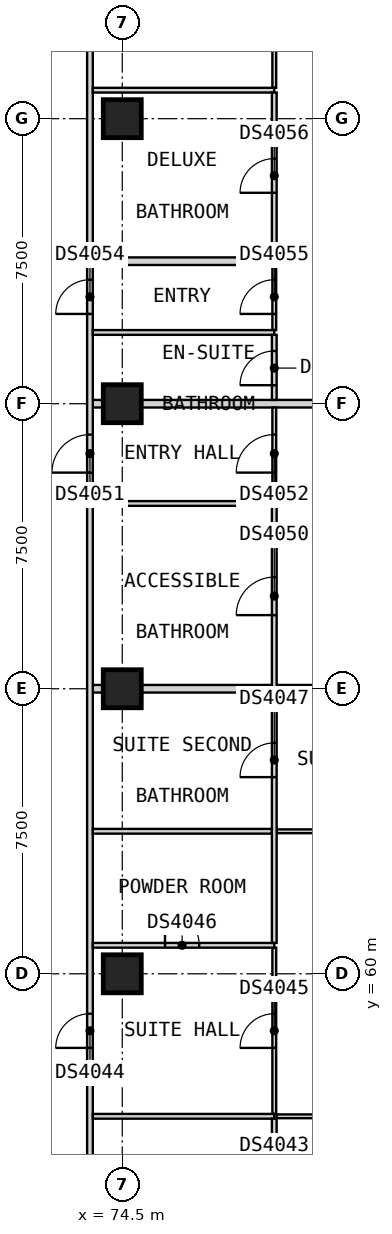
"""IFC4 building model, lengths in metres.
Left out: names, types, materials, properties, quantities, classifications, styles, units other than length and angle.
Written with IfcOpenShell. Run it as: python <this file> out.ifc"""

import sys

from ifc_helpers import new_model, si_unit, direction, frame, frame_2d, origin, origin_2d, place, context, subcontext, project, spatial, rectangle, extrude, element, fill, save


model = new_model("IFC4")
c1 = context("Model", 3, precision=1e-05, world=origin(), true_north=direction((0.0, 1.0)))
c2 = subcontext(c1, "Body", "Model", "MODEL_VIEW")
j1 = project(units=[si_unit("LENGTHUNIT", "METRE"), si_unit("PLANEANGLEUNIT", "RADIAN")], contexts=[c1])
p1 = place(None, origin())
s1 = spatial("IfcSite", under=j1, at=p1, CompositionType="ELEMENT")
p2 = place(p1, origin())
s2 = spatial("IfcBuilding", under=s1, at=p2, CompositionType="ELEMENT")
p3 = place(p2, frame((0.0, 0.0, 141.0)))
s3 = spatial("IfcBuildingStorey", under=s2, at=p3, CompositionType="ELEMENT", Elevation=141.0)
for number, where, z_axis, x_axis in (
    (1, (74.5, 60.0, 0.0), (0.0, 0.0, 1.0), (1.0, 0.0, 0.0)),
    (2, (74.5, 67.5, 0.0), (0.0, 0.0, 1.0), (1.0, 0.0, 0.0)),
    (3, (74.5, 75.0, 0.0), (0.0, 0.0, 1.0), (1.0, 0.0, 0.0)),
    (4, (74.5, 82.5, 0.0), (0.0, 0.0, 1.0), (1.0, 0.0, 0.0)),
):
    element("IfcColumn", number, at=place(p3, frame(where, z_axis=z_axis, x_axis=x_axis)), inside=s3, PredefinedType="COLUMN", context=c2, shape_type="SweptSolid", body=[
        extrude(rectangle(XDim=1.0, YDim=1.0, at=origin_2d()), origin(), (0.0, 0.0, 1.0), 3.6),
    ])
for number, where, z_axis, x_axis in (
    (5, (73.725, 67.5, 0.0), (0.0, 0.0, 1.0), (1.0, 0.0, 0.0)),
    (6, (73.725, 75.0, 0.0), (0.0, 0.0, 1.0), (1.0, 0.0, 0.0)),
):
    element("IfcWall", number, at=place(p3, frame(where, z_axis=z_axis, x_axis=x_axis)), inside=s3, PredefinedType="PARTITIONING", context=c2, shape_type="SweptSolid", body=[
        extrude(rectangle(XDim=12.525, YDim=0.2, at=frame_2d((6.262, 0.0))), origin(), (0.0, 0.0, 1.0), 3.35),
    ])
p4 = place(p3, frame((73.725, 78.75, 0.0), z_axis=(0.0, 0.0, 1.0), x_axis=(1.0, 0.0, 0.0)))
e7 = element("IfcWall", 7, at=p4, inside=s3, PredefinedType="PARTITIONING", context=c2, shape_type="SweptSolid", body=[
    extrude(rectangle(XDim=11.715, YDim=0.2, at=frame_2d((5.857, 0.0))), origin(), (0.0, 0.0, 1.0), 3.35),
])
p5 = place(p3, frame((73.65, 50.175, 0.0), z_axis=(0.0, 0.0, 1.0), x_axis=(0.0, 1.0, 0.0)))
e8 = element("IfcWall", 8, at=p5, inside=s3, PredefinedType="PARTITIONING", context=c2, shape_type="SweptSolid", body=[
    extrude(rectangle(XDim=38.4, YDim=0.15, at=frame_2d((19.2, 0.0))), origin(), (0.0, 0.0, 1.0), 3.35),
])
p6 = place(p5, frame((7.875, 0.0, 0.0)))
e9 = element("IfcOpeningElement", 9, at=p6, cuts=e8, PredefinedType="OPENING", context=c2, shape_type="SweptSolid", body=[
    extrude(rectangle(XDim=0.9, YDim=2.1, at=frame_2d((0.45, 1.05))), frame((0.0, 0.085, 0.0), z_axis=(0.0, -1.0, 0.0), x_axis=(1.0, 0.0, 0.0)), (0.0, 0.0, 1.0), 0.17),
])
p7 = place(p5, frame((23.012, 0.0, 0.0)))
e10 = element("IfcOpeningElement", 10, at=p7, cuts=e8, PredefinedType="OPENING", context=c2, shape_type="SweptSolid", body=[
    extrude(rectangle(XDim=1.0, YDim=2.1, at=frame_2d((0.5, 1.05))), frame((0.0, 0.085, 0.0), z_axis=(0.0, -1.0, 0.0), x_axis=(1.0, 0.0, 0.0)), (0.0, 0.0, 1.0), 0.17),
])
p8 = place(p5, frame((27.188, 0.0, 0.0)))
e11 = element("IfcOpeningElement", 11, at=p8, cuts=e8, PredefinedType="OPENING", context=c2, shape_type="SweptSolid", body=[
    extrude(rectangle(XDim=0.9, YDim=2.1, at=frame_2d((0.45, 1.05))), frame((0.0, 0.085, 0.0), z_axis=(0.0, -1.0, 0.0), x_axis=(1.0, 0.0, 0.0)), (0.0, 0.0, 1.0), 0.17),
])
p9 = place(p5, frame((34.125, 0.0, 0.0)))
e12 = element("IfcOpeningElement", 12, at=p9, cuts=e8, PredefinedType="OPENING", context=c2, shape_type="SweptSolid", body=[
    extrude(rectangle(XDim=0.9, YDim=2.1, at=frame_2d((0.45, 1.05))), frame((0.0, 0.085, 0.0), z_axis=(0.0, -1.0, 0.0), x_axis=(1.0, 0.0, 0.0)), (0.0, 0.0, 1.0), 0.17),
])
p10 = place(p3, frame((78.562, 56.25, 0.0), z_axis=(0.0, 0.0, 1.0), x_axis=(1.0, 0.0, 0.0)))
e13 = element("IfcWall", 13, at=p10, inside=s3, PredefinedType="PARTITIONING", context=c2, shape_type="SweptSolid", body=[
    extrude(rectangle(XDim=6.877, YDim=0.1, at=frame_2d((3.439, 0.0))), origin(), (0.0, 0.0, 1.0), 3.35),
])
p11 = place(p10, frame((3.363, 0.0, 0.0)))
e14 = element("IfcOpeningElement", 14, at=p11, cuts=e13, PredefinedType="OPENING", context=c2, shape_type="SweptSolid", body=[
    extrude(rectangle(XDim=0.9, YDim=2.1, at=frame_2d((0.45, 1.05))), frame((0.0, 0.06, 0.0), z_axis=(0.0, -1.0, 0.0), x_axis=(1.0, 0.0, 0.0)), (0.0, 0.0, 1.0), 0.12),
])
p12 = place(p3, frame((78.562, 63.75, 0.0), z_axis=(0.0, 0.0, 1.0), x_axis=(1.0, 0.0, 0.0)))
e15 = element("IfcWall", 15, at=p12, inside=s3, PredefinedType="PARTITIONING", context=c2, shape_type="SweptSolid", body=[
    extrude(rectangle(XDim=6.877, YDim=0.1, at=frame_2d((3.439, 0.0))), origin(), (0.0, 0.0, 1.0), 3.35),
])
p13 = place(p12, frame((3.363, 0.0, 0.0)))
e16 = element("IfcOpeningElement", 16, at=p13, cuts=e15, PredefinedType="OPENING", context=c2, shape_type="SweptSolid", body=[
    extrude(rectangle(XDim=0.9, YDim=2.1, at=frame_2d((0.45, 1.05))), frame((0.0, 0.06, 0.0), z_axis=(0.0, -1.0, 0.0), x_axis=(1.0, 0.0, 0.0)), (0.0, 0.0, 1.0), 0.12),
])
p14 = place(p3, frame((78.5, 56.312, 0.0), z_axis=(0.0, 0.0, 1.0), x_axis=(0.0, 1.0, 0.0)))
e17 = element("IfcWall", 17, at=p14, inside=s3, PredefinedType="PARTITIONING", context=c2, shape_type="SweptSolid", body=[
    extrude(rectangle(XDim=4.375, YDim=0.1, at=frame_2d((2.188, 0.0))), origin(), (0.0, 0.0, 1.0), 3.35),
])
p15 = place(p14, frame((1.738, 0.0, 0.0)))
e18 = element("IfcOpeningElement", 18, at=p15, cuts=e17, PredefinedType="OPENING", context=c2, shape_type="SweptSolid", body=[
    extrude(rectangle(XDim=0.9, YDim=2.1, at=frame_2d((0.45, 1.05))), frame((0.0, 0.06, 0.0), z_axis=(0.0, -1.0, 0.0), x_axis=(1.0, 0.0, 0.0)), (0.0, 0.0, 1.0), 0.12),
])
p16 = place(p3, frame((78.5, 72.438, 0.0), z_axis=(0.0, 0.0, 1.0), x_axis=(0.0, 1.0, 0.0)))
e19 = element("IfcWall", 19, at=p16, inside=s3, PredefinedType="PARTITIONING", context=c2, shape_type="SweptSolid", body=[
    extrude(rectangle(XDim=2.462, YDim=0.1, at=frame_2d((1.231, 0.0))), origin(), (0.0, 0.0, 1.0), 3.35),
])
p17 = place(p16, frame((0.75, 0.0, 0.0)))
e20 = element("IfcOpeningElement", 20, at=p17, cuts=e19, PredefinedType="OPENING", context=c2, shape_type="SweptSolid", body=[
    extrude(rectangle(XDim=1.0, YDim=2.1, at=frame_2d((0.5, 1.05))), frame((0.0, 0.06, 0.0), z_axis=(0.0, -1.0, 0.0), x_axis=(1.0, 0.0, 0.0)), (0.0, 0.0, 1.0), 0.12),
])
p18 = place(p3, frame((78.5, 76.938, 0.0), z_axis=(0.0, 0.0, 1.0), x_axis=(0.0, 1.0, 0.0)))
e21 = element("IfcWall", 21, at=p18, inside=s3, PredefinedType="PARTITIONING", context=c2, shape_type="SweptSolid", body=[
    extrude(rectangle(XDim=1.712, YDim=0.1, at=frame_2d((0.856, 0.0))), origin(), (0.0, 0.0, 1.0), 3.35),
])
p19 = place(p18, frame((0.425, 0.0, 0.0)))
e22 = element("IfcOpeningElement", 22, at=p19, cuts=e21, PredefinedType="OPENING", context=c2, shape_type="SweptSolid", body=[
    extrude(rectangle(XDim=0.9, YDim=2.1, at=frame_2d((0.45, 1.05))), frame((0.0, 0.06, 0.0), z_axis=(0.0, -1.0, 0.0), x_axis=(1.0, 0.0, 0.0)), (0.0, 0.0, 1.0), 0.12),
])
p20 = place(p3, frame((78.5, 83.312, 0.0), z_axis=(0.0, 0.0, 1.0), x_axis=(0.0, 1.0, 0.0)))
e23 = element("IfcWall", 23, at=p20, inside=s3, PredefinedType="PARTITIONING", context=c2, shape_type="SweptSolid", body=[
    extrude(rectangle(XDim=2.837, YDim=0.1, at=frame_2d((1.419, 0.0))), origin(), (0.0, 0.0, 1.0), 3.35),
])
p21 = place(p20, frame((0.988, 0.0, 0.0)))
e24 = element("IfcOpeningElement", 24, at=p21, cuts=e23, PredefinedType="OPENING", context=c2, shape_type="SweptSolid", body=[
    extrude(rectangle(XDim=0.9, YDim=2.1, at=frame_2d((0.45, 1.05))), frame((0.0, 0.06, 0.0), z_axis=(0.0, -1.0, 0.0), x_axis=(1.0, 0.0, 0.0)), (0.0, 0.0, 1.0), 0.12),
])
p22 = place(p3, frame((73.725, 56.25, 0.0), z_axis=(0.0, 0.0, 1.0), x_axis=(1.0, 0.0, 0.0)))
e25 = element("IfcWall", 25, at=p22, inside=s3, PredefinedType="PARTITIONING", context=c2, shape_type="SweptSolid", body=[
    extrude(rectangle(XDim=4.775, YDim=0.125, at=frame_2d((2.387, 0.0))), origin(), (0.0, 0.0, 1.0), 3.35),
])
p23 = place(p3, frame((73.725, 60.75, 0.0), z_axis=(0.0, 0.0, 1.0), x_axis=(1.0, 0.0, 0.0)))
e26 = element("IfcWall", 26, at=p23, inside=s3, PredefinedType="PARTITIONING", context=c2, shape_type="SweptSolid", body=[
    extrude(rectangle(XDim=4.775, YDim=0.125, at=frame_2d((2.387, 0.0))), origin(), (0.0, 0.0, 1.0), 3.35),
])
p24 = place(p23, frame((1.9, 0.0, 0.0)))
e27 = element("IfcOpeningElement", 27, at=p24, cuts=e26, PredefinedType="OPENING", context=c2, shape_type="SweptSolid", body=[
    extrude(rectangle(XDim=0.9, YDim=2.1, at=frame_2d((0.45, 1.05))), frame((0.0, 0.073, 0.0), z_axis=(0.0, -1.0, 0.0), x_axis=(1.0, 0.0, 0.0)), (0.0, 0.0, 1.0), 0.145),
])
p25 = place(p3, frame((73.725, 63.75, 0.0), z_axis=(0.0, 0.0, 1.0), x_axis=(1.0, 0.0, 0.0)))
e28 = element("IfcWall", 28, at=p25, inside=s3, PredefinedType="PARTITIONING", context=c2, shape_type="SweptSolid", body=[
    extrude(rectangle(XDim=4.712, YDim=0.125, at=frame_2d((2.356, 0.0))), origin(), (0.0, 0.0, 1.0), 3.35),
])
for number, where, z_axis, x_axis in (
    (29, (73.725, 72.375, 0.0), (0.0, 0.0, 1.0), (1.0, 0.0, 0.0)),
    (30, (73.725, 76.875, 0.0), (0.0, 0.0, 1.0), (1.0, 0.0, 0.0)),
    (31, (73.725, 83.25, 0.0), (0.0, 0.0, 1.0), (1.0, 0.0, 0.0)),
):
    element("IfcWall", number, at=place(p3, frame(where, z_axis=z_axis, x_axis=x_axis)), inside=s3, PredefinedType="PARTITIONING", context=c2, shape_type="SweptSolid", body=[
        extrude(rectangle(XDim=4.775, YDim=0.125, at=frame_2d((2.387, 0.0))), origin(), (0.0, 0.0, 1.0), 3.35),
    ])
p26 = place(p3, frame((78.5, 52.6, 0.0), z_axis=(0.0, 0.0, 1.0), x_axis=(0.0, 1.0, 0.0)))
e32 = element("IfcWall", 32, at=p26, inside=s3, PredefinedType="PARTITIONING", context=c2, shape_type="SweptSolid", body=[
    extrude(rectangle(XDim=3.587, YDim=0.125, at=frame_2d((1.794, 0.0))), origin(), (0.0, 0.0, 1.0), 3.35),
])
p27 = place(p26, frame((1.325, 0.0, 0.0)))
e33 = element("IfcOpeningElement", 33, at=p27, cuts=e32, PredefinedType="OPENING", context=c2, shape_type="SweptSolid", body=[
    extrude(rectangle(XDim=0.9, YDim=2.1, at=frame_2d((0.45, 1.05))), frame((0.0, 0.073, 0.0), z_axis=(0.0, -1.0, 0.0), x_axis=(1.0, 0.0, 0.0)), (0.0, 0.0, 1.0), 0.145),
])
p28 = place(p3, frame((78.5, 60.812, 0.0), z_axis=(0.0, 0.0, 1.0), x_axis=(0.0, 1.0, 0.0)))
e34 = element("IfcWall", 34, at=p28, inside=s3, PredefinedType="PARTITIONING", context=c2, shape_type="SweptSolid", body=[
    extrude(rectangle(XDim=11.5, YDim=0.125, at=frame_2d((5.75, 0.0))), origin(), (0.0, 0.0, 1.0), 3.35),
])
p29 = place(p28, frame((4.363, 0.0, 0.0)))
e35 = element("IfcOpeningElement", 35, at=p29, cuts=e34, PredefinedType="OPENING", context=c2, shape_type="SweptSolid", body=[
    extrude(rectangle(XDim=0.9, YDim=2.1, at=frame_2d((0.45, 1.05))), frame((0.0, 0.073, 0.0), z_axis=(0.0, -1.0, 0.0), x_axis=(1.0, 0.0, 0.0)), (0.0, 0.0, 1.0), 0.145),
])
p30 = place(p28, frame((8.625, 0.0, 0.0)))
e36 = element("IfcOpeningElement", 36, at=p30, cuts=e34, PredefinedType="OPENING", context=c2, shape_type="SweptSolid", body=[
    extrude(rectangle(XDim=1.0, YDim=2.1, at=frame_2d((0.5, 1.05))), frame((0.0, 0.073, 0.0), z_axis=(0.0, -1.0, 0.0), x_axis=(1.0, 0.0, 0.0)), (0.0, 0.0, 1.0), 0.145),
])
p31 = place(p3, frame((78.5, 75.1, 0.0), z_axis=(0.0, 0.0, 1.0), x_axis=(0.0, 1.0, 0.0)))
e37 = element("IfcWall", 37, at=p31, inside=s3, PredefinedType="PARTITIONING", context=c2, shape_type="SweptSolid", body=[
    extrude(rectangle(XDim=1.712, YDim=0.125, at=frame_2d((0.856, 0.0))), origin(), (0.0, 0.0, 1.0), 3.35),
])
p32 = place(p31, frame((0.387, 0.0, 0.0)))
e38 = element("IfcOpeningElement", 38, at=p32, cuts=e37, PredefinedType="OPENING", context=c2, shape_type="SweptSolid", body=[
    extrude(rectangle(XDim=0.9, YDim=2.1, at=frame_2d((0.45, 1.05))), frame((0.0, 0.073, 0.0), z_axis=(0.0, -1.0, 0.0), x_axis=(1.0, 0.0, 0.0)), (0.0, 0.0, 1.0), 0.145),
])
p33 = place(p3, frame((78.5, 78.85, 0.0), z_axis=(0.0, 0.0, 1.0), x_axis=(0.0, 1.0, 0.0)))
e39 = element("IfcWall", 39, at=p33, inside=s3, PredefinedType="PARTITIONING", context=c2, shape_type="SweptSolid", body=[
    extrude(rectangle(XDim=4.337, YDim=0.125, at=frame_2d((2.169, 0.0))), origin(), (0.0, 0.0, 1.0), 3.35),
])
p34 = place(p33, frame((1.7, 0.0, 0.0)))
e40 = element("IfcOpeningElement", 40, at=p34, cuts=e39, PredefinedType="OPENING", context=c2, shape_type="SweptSolid", body=[
    extrude(rectangle(XDim=0.9, YDim=2.1, at=frame_2d((0.45, 1.05))), frame((0.0, 0.073, 0.0), z_axis=(0.0, -1.0, 0.0), x_axis=(1.0, 0.0, 0.0)), (0.0, 0.0, 1.0), 0.145),
])
p35 = place(p6, origin())
e41 = element("IfcDoor", 41, at=p35, inside=s3, OperationType="SINGLE_SWING_RIGHT", PredefinedType="DOOR", context=c2, shape_type="SweptSolid", body=[
    extrude(rectangle(XDim=0.9, YDim=2.1, at=frame_2d((0.45, 1.05))), frame((0.0, 0.025, 0.0), z_axis=(0.0, -1.0, 0.0), x_axis=(1.0, 0.0, 0.0)), (0.0, 0.0, 1.0), 0.05),
])
fill(e9, e41)
p36 = place(p15, origin())
e42 = element("IfcDoor", 42, at=p36, inside=s3, OperationType="SINGLE_SWING_LEFT", PredefinedType="DOOR", context=c2, shape_type="SweptSolid", body=[
    extrude(rectangle(XDim=0.9, YDim=2.1, at=frame_2d((0.45, 1.05))), frame((0.0, 0.025, 0.0), z_axis=(0.0, -1.0, 0.0), x_axis=(1.0, 0.0, 0.0)), (0.0, 0.0, 1.0), 0.05),
])
fill(e18, e42)
p37 = place(p24, origin())
e43 = element("IfcDoor", 43, at=p37, inside=s3, OperationType="SINGLE_SWING_RIGHT", PredefinedType="DOOR", context=c2, shape_type="SweptSolid", body=[
    extrude(rectangle(XDim=0.9, YDim=2.1, at=frame_2d((0.45, 1.05))), frame((0.0, 0.025, 0.0), z_axis=(0.0, -1.0, 0.0), x_axis=(1.0, 0.0, 0.0)), (0.0, 0.0, 1.0), 0.05),
])
fill(e27, e43)
p38 = place(p29, origin())
e44 = element("IfcDoor", 44, at=p38, inside=s3, OperationType="SINGLE_SWING_LEFT", PredefinedType="DOOR", context=c2, shape_type="SweptSolid", body=[
    extrude(rectangle(XDim=0.9, YDim=2.1, at=frame_2d((0.45, 1.05))), frame((0.0, 0.025, 0.0), z_axis=(0.0, -1.0, 0.0), x_axis=(1.0, 0.0, 0.0)), (0.0, 0.0, 1.0), 0.05),
])
fill(e35, e44)
p39 = place(p30, origin())
e45 = element("IfcDoor", 45, at=p39, inside=s3, OperationType="SINGLE_SWING_LEFT", PredefinedType="DOOR", context=c2, shape_type="SweptSolid", body=[
    extrude(rectangle(XDim=1.0, YDim=2.1, at=frame_2d((0.5, 1.05))), frame((0.0, 0.025, 0.0), z_axis=(0.0, -1.0, 0.0), x_axis=(1.0, 0.0, 0.0)), (0.0, 0.0, 1.0), 0.05),
])
fill(e36, e45)
p40 = place(p7, origin())
e46 = element("IfcDoor", 46, at=p40, inside=s3, OperationType="SINGLE_SWING_RIGHT", PredefinedType="DOOR", context=c2, shape_type="SweptSolid", body=[
    extrude(rectangle(XDim=1.0, YDim=2.1, at=frame_2d((0.5, 1.05))), frame((0.0, 0.025, 0.0), z_axis=(0.0, -1.0, 0.0), x_axis=(1.0, 0.0, 0.0)), (0.0, 0.0, 1.0), 0.05),
])
fill(e10, e46)
p41 = place(p17, origin())
e47 = element("IfcDoor", 47, at=p41, inside=s3, OperationType="SINGLE_SWING_LEFT", PredefinedType="DOOR", context=c2, shape_type="SweptSolid", body=[
    extrude(rectangle(XDim=1.0, YDim=2.1, at=frame_2d((0.5, 1.05))), frame((0.0, 0.025, 0.0), z_axis=(0.0, -1.0, 0.0), x_axis=(1.0, 0.0, 0.0)), (0.0, 0.0, 1.0), 0.05),
])
fill(e20, e47)
p42 = place(p32, origin())
e48 = element("IfcDoor", 48, at=p42, inside=s3, OperationType="SINGLE_SWING_LEFT", PredefinedType="DOOR", context=c2, shape_type="SweptSolid", body=[
    extrude(rectangle(XDim=0.9, YDim=2.1, at=frame_2d((0.45, 1.05))), frame((0.0, 0.025, 0.0), z_axis=(0.0, -1.0, 0.0), x_axis=(1.0, 0.0, 0.0)), (0.0, 0.0, 1.0), 0.05),
])
fill(e38, e48)
p43 = place(p8, origin())
e49 = element("IfcDoor", 49, at=p43, inside=s3, OperationType="SINGLE_SWING_RIGHT", PredefinedType="DOOR", context=c2, shape_type="SweptSolid", body=[
    extrude(rectangle(XDim=0.9, YDim=2.1, at=frame_2d((0.45, 1.05))), frame((0.0, 0.025, 0.0), z_axis=(0.0, -1.0, 0.0), x_axis=(1.0, 0.0, 0.0)), (0.0, 0.0, 1.0), 0.05),
])
fill(e11, e49)
p44 = place(p19, origin())
e50 = element("IfcDoor", 50, at=p44, inside=s3, OperationType="SINGLE_SWING_LEFT", PredefinedType="DOOR", context=c2, shape_type="SweptSolid", body=[
    extrude(rectangle(XDim=0.9, YDim=2.1, at=frame_2d((0.45, 1.05))), frame((0.0, 0.025, 0.0), z_axis=(0.0, -1.0, 0.0), x_axis=(1.0, 0.0, 0.0)), (0.0, 0.0, 1.0), 0.05),
])
fill(e22, e50)
p45 = place(p34, origin())
e51 = element("IfcDoor", 51, at=p45, inside=s3, OperationType="SINGLE_SWING_LEFT", PredefinedType="DOOR", context=c2, shape_type="SweptSolid", body=[
    extrude(rectangle(XDim=0.9, YDim=2.1, at=frame_2d((0.45, 1.05))), frame((0.0, 0.025, 0.0), z_axis=(0.0, -1.0, 0.0), x_axis=(1.0, 0.0, 0.0)), (0.0, 0.0, 1.0), 0.05),
])
fill(e40, e51)
save(model, sys.argv[1])
